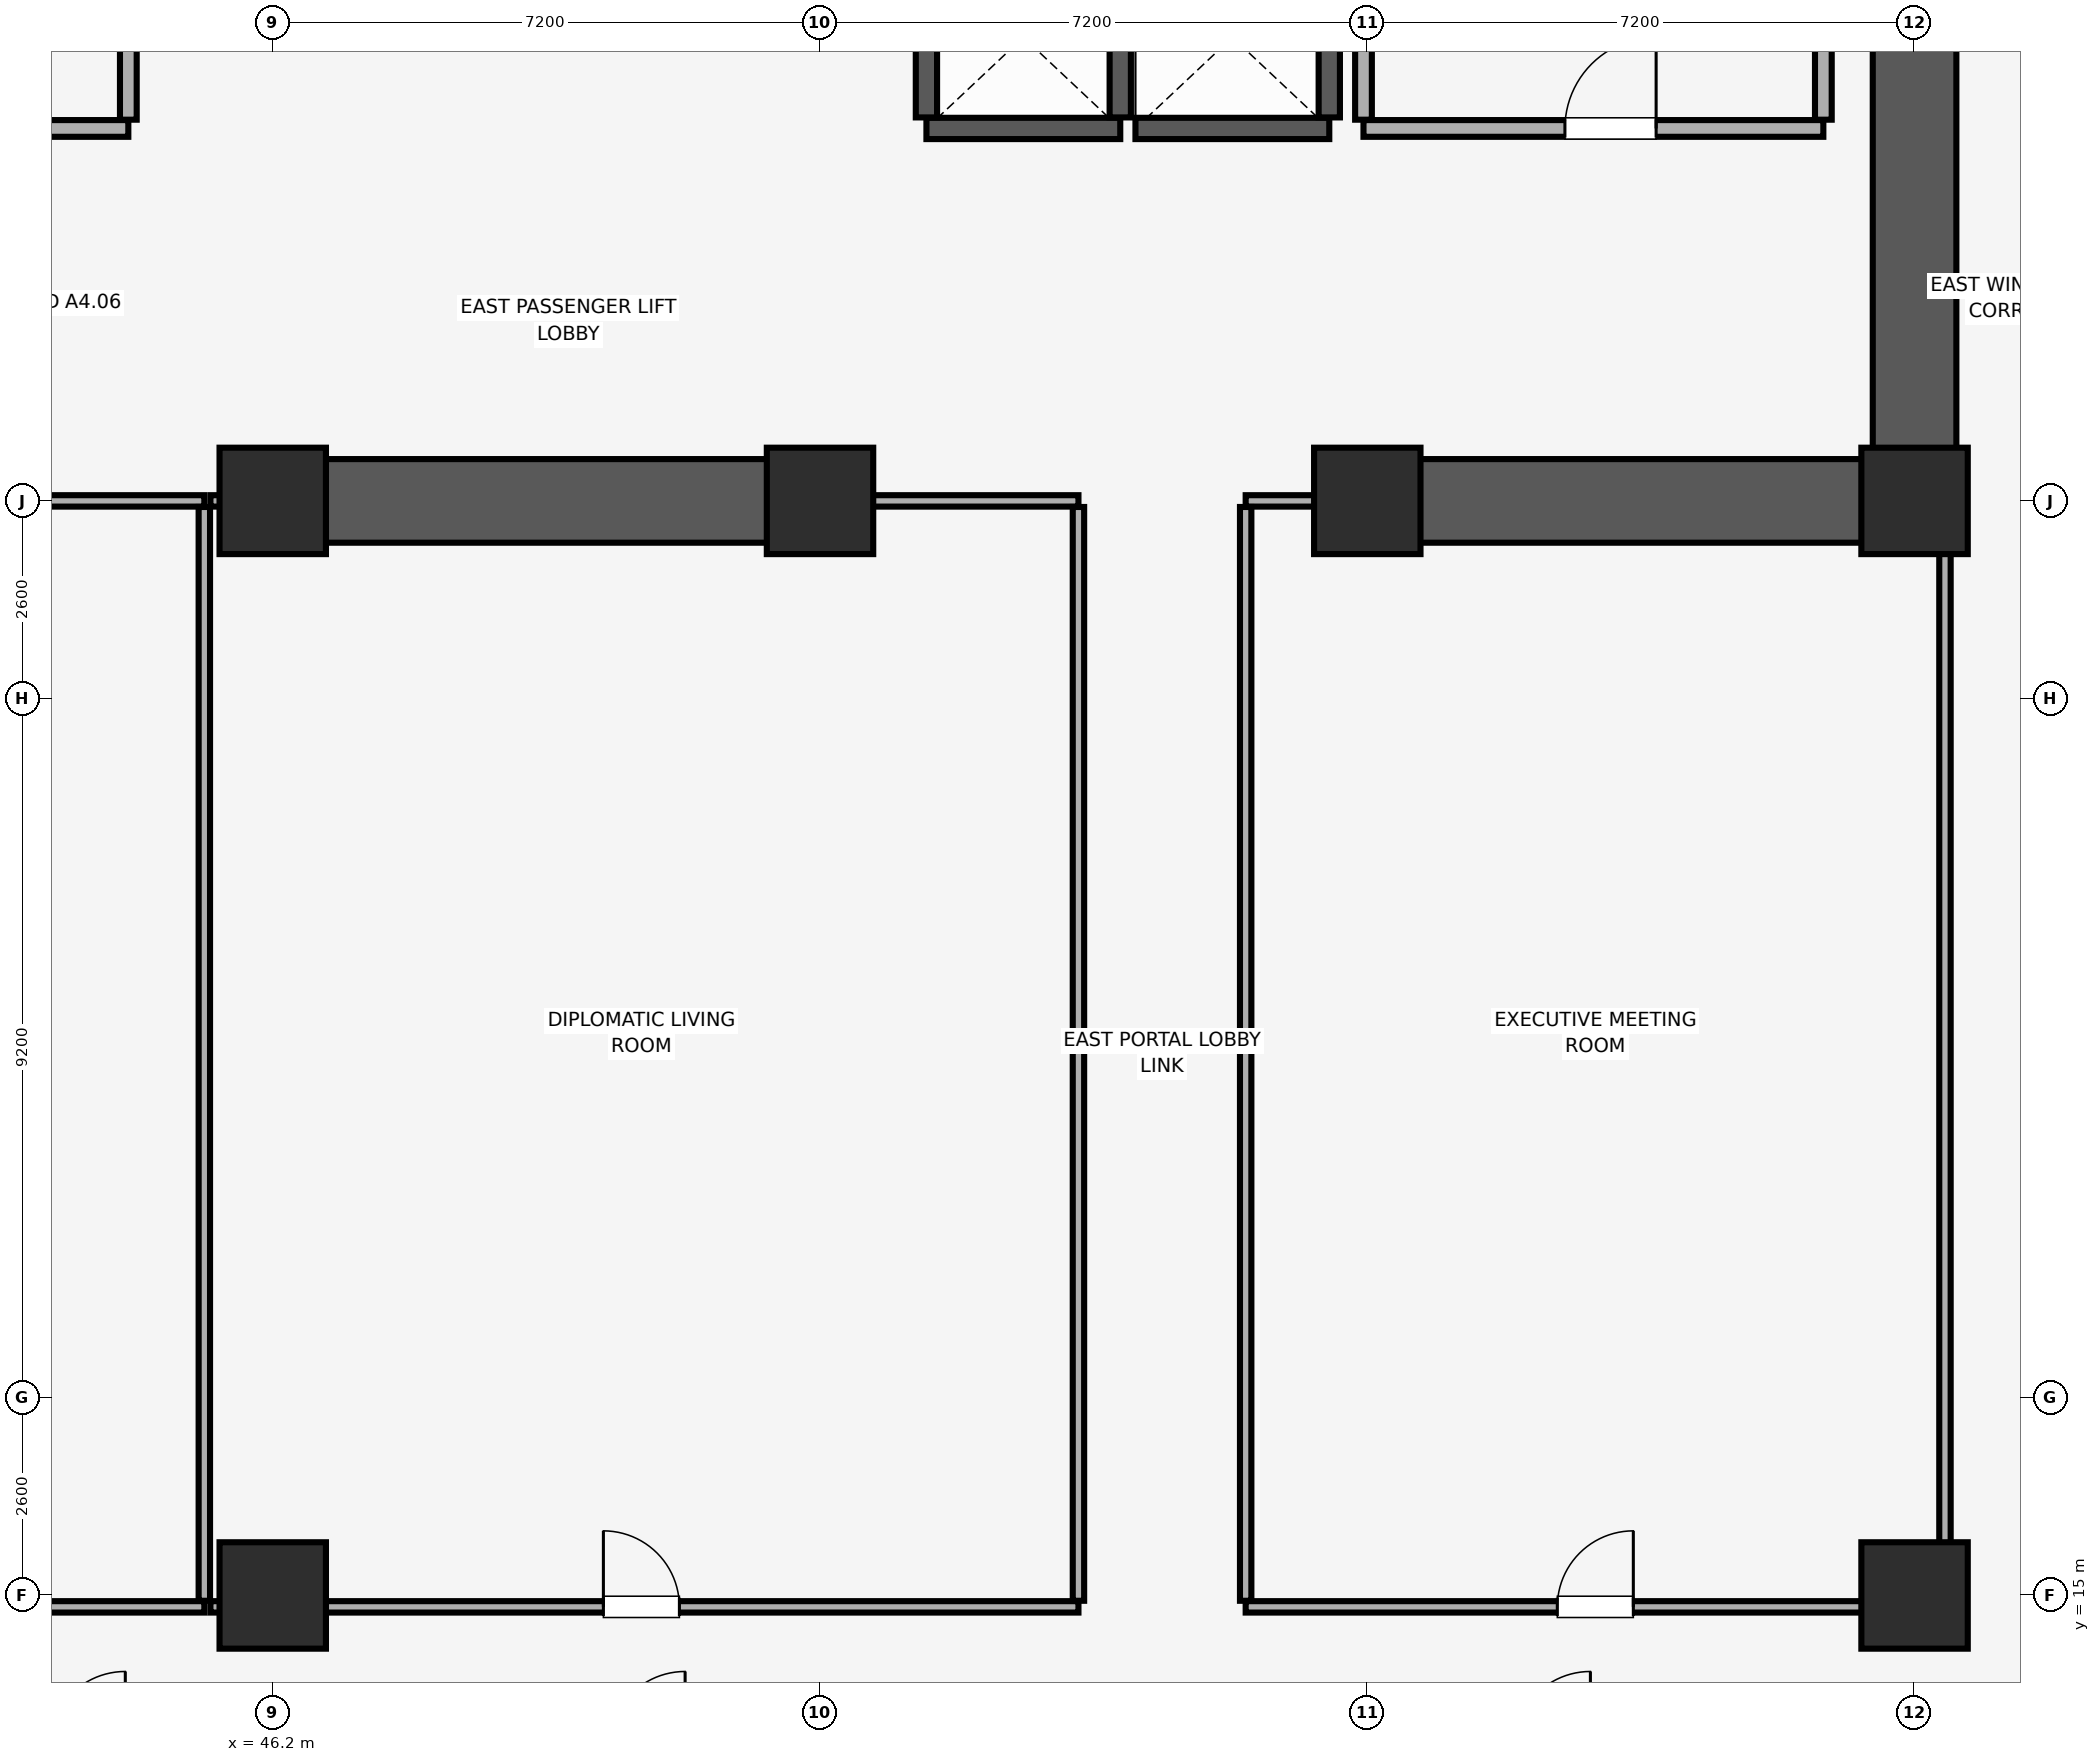
"""IFC4 building model, lengths in metres.
Left out: names, types, materials, properties, quantities, classifications, styles, units other than length and angle.
Written with IfcOpenShell. Run it as: python <this file> out.ifc"""

import sys

from ifc_helpers import new_model, si_unit, direction, frame, frame_2d, origin, origin_2d, place, context, subcontext, project, spatial, rectangle, extrude, element, fill, save


model = new_model("IFC4")
c1 = context("Model", 3, precision=1e-05, world=origin(), true_north=direction((0.0, 1.0)))
c2 = subcontext(c1, "Body", "Model", "MODEL_VIEW")
j1 = project(units=[si_unit("LENGTHUNIT", "METRE"), si_unit("PLANEANGLEUNIT", "RADIAN")], contexts=[c1])
p1 = place(None, origin())
s1 = spatial("IfcSite", under=j1, at=p1, CompositionType="ELEMENT")
p2 = place(p1, origin())
s2 = spatial("IfcBuilding", under=s1, at=p2, CompositionType="ELEMENT")
p3 = place(p2, frame((0.0, 0.0, 68.9)))
s3 = spatial("IfcBuildingStorey", under=s2, at=p3, CompositionType="ELEMENT", Elevation=68.9)
for number, where, z_axis, x_axis in (
    (1, (46.2, 15.0, 0.0), (0.0, 0.0, 1.0), (1.0, 0.0, 0.0)),
    (2, (67.8, 15.0, 0.0), (0.0, 0.0, 1.0), (1.0, 0.0, 0.0)),
    (3, (46.2, 29.4, 0.0), (0.0, 0.0, 1.0), (1.0, 0.0, 0.0)),
    (4, (53.4, 29.4, 0.0), (0.0, 0.0, 1.0), (1.0, 0.0, 0.0)),
    (5, (60.6, 29.4, 0.0), (0.0, 0.0, 1.0), (1.0, 0.0, 0.0)),
    (6, (67.8, 29.4, 0.0), (0.0, 0.0, 1.0), (1.0, 0.0, 0.0)),
):
    element("IfcColumn", number, at=place(p3, frame(where, z_axis=z_axis, x_axis=x_axis)), inside=s3, PredefinedType="COLUMN", context=c2, shape_type="SweptSolid", body=[
        extrude(rectangle(XDim=1.4, YDim=1.4, at=origin_2d()), origin(), (0.0, 0.0, 1.0), 3.51),
    ])
p4 = place(p3, frame((67.8, 29.4, 0.0), z_axis=(0.0, 0.0, 1.0), x_axis=(0.0, 1.0, 0.0)))
e7 = element("IfcWall", 7, at=p4, inside=s3, PredefinedType="SHEAR", context=c2, shape_type="SweptSolid", body=[
    extrude(rectangle(XDim=19.2, YDim=1.1, at=frame_2d((9.6, 0.0))), origin(), (0.0, 0.0, 1.0), 3.51),
])
p5 = place(p3, frame((46.0, 29.4, 0.0), z_axis=(0.0, 0.0, 1.0), x_axis=(1.0, 0.0, 0.0)))
e8 = element("IfcWall", 8, at=p5, inside=s3, PredefinedType="SHEAR", context=c2, shape_type="SweptSolid", body=[
    extrude(rectangle(XDim=7.6, YDim=1.1, at=frame_2d((3.8, 0.0))), origin(), (0.0, 0.0, 1.0), 3.51),
])
p6 = place(p3, frame((60.4, 29.4, 0.0), z_axis=(0.0, 0.0, 1.0), x_axis=(1.0, 0.0, 0.0)))
e9 = element("IfcWall", 9, at=p6, inside=s3, PredefinedType="SHEAR", context=c2, shape_type="SweptSolid", body=[
    extrude(rectangle(XDim=6.845, YDim=1.1, at=frame_2d((3.423, 0.0))), origin(), (0.0, 0.0, 1.0), 3.51),
])
p7 = place(p3, frame((54.8, 34.3, 0.0), z_axis=(0.0, 0.0, 1.0), x_axis=(1.0, 0.0, 0.0)))
e10 = element("IfcWall", 10, at=p7, inside=s3, PredefinedType="SHEAR", context=c2, shape_type="SweptSolid", body=[
    extrude(rectangle(XDim=2.55, YDim=0.28, at=frame_2d((1.275, 0.0))), origin(), (0.0, 0.0, 1.0), 3.51),
])
for number, where, z_axis, x_axis in (
    (11, (54.8, 34.445, 0.0), (0.0, 0.0, 1.0), (0.0, 1.0, 0.0)),
    (12, (57.35, 34.445, 0.0), (0.0, 0.0, 1.0), (0.0, 1.0, 0.0)),
):
    element("IfcWall", number, at=place(p3, frame(where, z_axis=z_axis, x_axis=x_axis)), inside=s3, PredefinedType="SHEAR", context=c2, shape_type="SweptSolid", body=[
        extrude(rectangle(XDim=2.11, YDim=0.28, at=frame_2d((1.055, 0.0))), origin(), (0.0, 0.0, 1.0), 3.51),
    ])
p8 = place(p3, frame((57.55, 34.3, 0.0), z_axis=(0.0, 0.0, 1.0), x_axis=(1.0, 0.0, 0.0)))
e13 = element("IfcWall", 13, at=p8, inside=s3, PredefinedType="SHEAR", context=c2, shape_type="SweptSolid", body=[
    extrude(rectangle(XDim=2.55, YDim=0.28, at=frame_2d((1.275, 0.0))), origin(), (0.0, 0.0, 1.0), 3.51),
])
p9 = place(p3, frame((60.1, 34.445, 0.0), z_axis=(0.0, 0.0, 1.0), x_axis=(0.0, 1.0, 0.0)))
e14 = element("IfcWall", 14, at=p9, inside=s3, PredefinedType="SHEAR", context=c2, shape_type="SweptSolid", body=[
    extrude(rectangle(XDim=2.11, YDim=0.28, at=frame_2d((1.055, 0.0))), origin(), (0.0, 0.0, 1.0), 3.51),
])
p10 = place(p3, frame((60.55, 34.3, 0.0), z_axis=(0.0, 0.0, 1.0), x_axis=(1.0, 0.0, 0.0)))
e15 = element("IfcWall", 15, at=p10, inside=s3, PredefinedType="PARTITIONING", context=c2, shape_type="SweptSolid", body=[
    extrude(rectangle(XDim=6.05, YDim=0.22, at=frame_2d((3.025, 0.0))), origin(), (0.0, 0.0, 1.0), 3.51),
])
p11 = place(p10, frame((2.65, 0.0, 0.0)))
e16 = element("IfcOpeningElement", 16, at=p11, cuts=e15, PredefinedType="OPENING", context=c2, shape_type="SweptSolid", body=[
    extrude(rectangle(XDim=1.2, YDim=2.15, at=frame_2d((0.6, 1.075))), frame((0.0, 0.12, 0.0), z_axis=(0.0, -1.0, 0.0), x_axis=(1.0, 0.0, 0.0)), (0.0, 0.0, 1.0), 0.24),
])
p12 = place(p3, frame((60.55, 34.415, 0.0), z_axis=(0.0, 0.0, 1.0), x_axis=(0.0, 1.0, 0.0)))
e17 = element("IfcWall", 17, at=p12, inside=s3, PredefinedType="PARTITIONING", context=c2, shape_type="SweptSolid", body=[
    extrude(rectangle(XDim=5.64, YDim=0.22, at=frame_2d((2.82, 0.0))), origin(), (0.0, 0.0, 1.0), 3.51),
])
p13 = place(p3, frame((66.6, 34.415, 0.0), z_axis=(0.0, 0.0, 1.0), x_axis=(0.0, 1.0, 0.0)))
e18 = element("IfcWall", 18, at=p13, inside=s3, PredefinedType="PARTITIONING", context=c2, shape_type="SweptSolid", body=[
    extrude(rectangle(XDim=5.43, YDim=0.22, at=frame_2d((2.715, 0.0))), origin(), (0.0, 0.0, 1.0), 3.51),
])
p14 = place(p3, frame((39.7, 34.3, 0.0), z_axis=(0.0, 0.0, 1.0), x_axis=(1.0, 0.0, 0.0)))
e19 = element("IfcWall", 19, at=p14, inside=s3, PredefinedType="PARTITIONING", context=c2, shape_type="SweptSolid", body=[
    extrude(rectangle(XDim=4.6, YDim=0.22, at=frame_2d((2.3, 0.0))), origin(), (0.0, 0.0, 1.0), 3.51),
])
p15 = place(p14, frame((1.7, 0.0, 0.0)))
e20 = element("IfcOpeningElement", 20, at=p15, cuts=e19, PredefinedType="OPENING", context=c2, shape_type="SweptSolid", body=[
    extrude(rectangle(XDim=1.2, YDim=2.15, at=frame_2d((0.6, 1.075))), frame((0.0, 0.12, 0.0), z_axis=(0.0, -1.0, 0.0), x_axis=(1.0, 0.0, 0.0)), (0.0, 0.0, 1.0), 0.24),
])
p16 = place(p3, frame((44.3, 34.415, 0.0), z_axis=(0.0, 0.0, 1.0), x_axis=(0.0, 1.0, 0.0)))
e21 = element("IfcWall", 21, at=p16, inside=s3, PredefinedType="PARTITIONING", context=c2, shape_type="SweptSolid", body=[
    extrude(rectangle(XDim=5.785, YDim=0.22, at=frame_2d((2.893, 0.0))), origin(), (0.0, 0.0, 1.0), 3.51),
])
p17 = place(p3, frame((27.2, 14.85, 0.0), z_axis=(0.0, 0.0, 1.0), x_axis=(1.0, 0.0, 0.0)))
e22 = element("IfcWall", 22, at=p17, inside=s3, PredefinedType="PARTITIONING", context=c2, shape_type="SweptSolid", body=[
    extrude(rectangle(XDim=18.1, YDim=0.15, at=frame_2d((9.05, 0.0))), origin(), (0.0, 0.0, 1.0), 2.86),
])
p18 = place(p17, frame((8.3, 0.0, 0.0)))
e23 = element("IfcOpeningElement", 23, at=p18, cuts=e22, PredefinedType="OPENING", context=c2, shape_type="SweptSolid", body=[
    extrude(rectangle(XDim=1.5, YDim=2.25, at=frame_2d((0.75, 1.125))), frame((0.0, 0.085, 0.0), z_axis=(0.0, -1.0, 0.0), x_axis=(1.0, 0.0, 0.0)), (0.0, 0.0, 1.0), 0.17),
])
p19 = place(p3, frame((38.01, 29.4, 0.0), z_axis=(0.0, 0.0, 1.0), x_axis=(1.0, 0.0, 0.0)))
e24 = element("IfcWall", 24, at=p19, inside=s3, PredefinedType="PARTITIONING", context=c2, shape_type="SweptSolid", body=[
    extrude(rectangle(XDim=7.29, YDim=0.15, at=frame_2d((3.645, 0.0))), origin(), (0.0, 0.0, 1.0), 2.41),
])
p20 = place(p3, frame((45.3, 14.93, 0.0), z_axis=(0.0, 0.0, 1.0), x_axis=(0.0, 1.0, 0.0)))
e25 = element("IfcWall", 25, at=p20, inside=s3, PredefinedType="PARTITIONING", context=c2, shape_type="SweptSolid", body=[
    extrude(rectangle(XDim=14.39, YDim=0.15, at=frame_2d((7.195, 0.0))), origin(), (0.0, 0.0, 1.0), 3.51),
])
p21 = place(p3, frame((45.38, 14.85, 0.0), z_axis=(0.0, 0.0, 1.0), x_axis=(1.0, 0.0, 0.0)))
e26 = element("IfcWall", 26, at=p21, inside=s3, PredefinedType="PARTITIONING", context=c2, shape_type="SweptSolid", body=[
    extrude(rectangle(XDim=11.42, YDim=0.15, at=frame_2d((5.71, 0.0))), origin(), (0.0, 0.0, 1.0), 2.86),
])
p22 = place(p21, frame((5.17, 0.0, 0.0)))
e27 = element("IfcOpeningElement", 27, at=p22, cuts=e26, PredefinedType="OPENING", context=c2, shape_type="SweptSolid", body=[
    extrude(rectangle(XDim=1.0, YDim=2.15, at=frame_2d((0.5, 1.075))), frame((0.0, 0.085, 0.0), z_axis=(0.0, -1.0, 0.0), x_axis=(1.0, 0.0, 0.0)), (0.0, 0.0, 1.0), 0.17),
])
p23 = place(p3, frame((45.38, 29.4, 0.0), z_axis=(0.0, 0.0, 1.0), x_axis=(1.0, 0.0, 0.0)))
e28 = element("IfcWall", 28, at=p23, inside=s3, PredefinedType="PARTITIONING", context=c2, shape_type="SweptSolid", body=[
    extrude(rectangle(XDim=0.61, YDim=0.15, at=frame_2d((0.305, 0.0))), origin(), (0.0, 0.0, 1.0), 2.41),
])
p24 = place(p3, frame((53.61, 29.4, 0.0), z_axis=(0.0, 0.0, 1.0), x_axis=(1.0, 0.0, 0.0)))
e29 = element("IfcWall", 29, at=p24, inside=s3, PredefinedType="PARTITIONING", context=c2, shape_type="SweptSolid", body=[
    extrude(rectangle(XDim=3.19, YDim=0.15, at=frame_2d((1.595, 0.0))), origin(), (0.0, 0.0, 1.0), 2.41),
])
p25 = place(p3, frame((56.8, 14.93, 0.0), z_axis=(0.0, 0.0, 1.0), x_axis=(0.0, 1.0, 0.0)))
e30 = element("IfcWall", 30, at=p25, inside=s3, PredefinedType="PARTITIONING", context=c2, shape_type="SweptSolid", body=[
    extrude(rectangle(XDim=14.39, YDim=0.15, at=frame_2d((7.195, 0.0))), origin(), (0.0, 0.0, 1.0), 2.977),
])
p26 = place(p3, frame((59.0, 14.85, 0.0), z_axis=(0.0, 0.0, 1.0), x_axis=(1.0, 0.0, 0.0)))
e31 = element("IfcWall", 31, at=p26, inside=s3, PredefinedType="PARTITIONING", context=c2, shape_type="SweptSolid", body=[
    extrude(rectangle(XDim=9.2, YDim=0.15, at=frame_2d((4.6, 0.0))), origin(), (0.0, 0.0, 1.0), 2.86),
])
p27 = place(p26, frame((4.1, 0.0, 0.0)))
e32 = element("IfcOpeningElement", 32, at=p27, cuts=e31, PredefinedType="OPENING", context=c2, shape_type="SweptSolid", body=[
    extrude(rectangle(XDim=1.0, YDim=2.15, at=frame_2d((0.5, 1.075))), frame((0.0, 0.085, 0.0), z_axis=(0.0, -1.0, 0.0), x_axis=(1.0, 0.0, 0.0)), (0.0, 0.0, 1.0), 0.17),
])
p28 = place(p3, frame((59.0, 29.4, 0.0), z_axis=(0.0, 0.0, 1.0), x_axis=(1.0, 0.0, 0.0)))
e33 = element("IfcWall", 33, at=p28, inside=s3, PredefinedType="PARTITIONING", context=c2, shape_type="SweptSolid", body=[
    extrude(rectangle(XDim=1.39, YDim=0.15, at=frame_2d((0.695, 0.0))), origin(), (0.0, 0.0, 1.0), 2.41),
])
p29 = place(p3, frame((59.0, 14.93, 0.0), z_axis=(0.0, 0.0, 1.0), x_axis=(0.0, 1.0, 0.0)))
e34 = element("IfcWall", 34, at=p29, inside=s3, PredefinedType="PARTITIONING", context=c2, shape_type="SweptSolid", body=[
    extrude(rectangle(XDim=14.39, YDim=0.15, at=frame_2d((7.195, 0.0))), origin(), (0.0, 0.0, 1.0), 3.51),
])
p30 = place(p3, frame((68.2, 14.93, 0.0), z_axis=(0.0, 0.0, 1.0), x_axis=(0.0, 1.0, 0.0)))
e35 = element("IfcWall", 35, at=p30, inside=s3, PredefinedType="PARTITIONING", context=c2, shape_type="SweptSolid", body=[
    extrude(rectangle(XDim=14.46, YDim=0.15, at=frame_2d((7.23, 0.0))), origin(), (0.0, 0.0, 1.0), 3.51),
])
p31 = place(p11, origin())
e36 = element("IfcDoor", 36, at=p31, inside=s3, OperationType="SINGLE_SWING_RIGHT", PredefinedType="DOOR", context=c2, shape_type="SweptSolid", body=[
    extrude(rectangle(XDim=1.2, YDim=2.15, at=frame_2d((0.6, 1.075))), frame((0.0, 0.025, 0.0), z_axis=(0.0, -1.0, 0.0), x_axis=(1.0, 0.0, 0.0)), (0.0, 0.0, 1.0), 0.05),
])
fill(e16, e36)
p32 = place(p22, origin())
e37 = element("IfcDoor", 37, at=p32, inside=s3, OperationType="SINGLE_SWING_LEFT", PredefinedType="DOOR", context=c2, shape_type="SweptSolid", body=[
    extrude(rectangle(XDim=1.0, YDim=2.15, at=frame_2d((0.5, 1.075))), frame((0.0, 0.025, 0.0), z_axis=(0.0, -1.0, 0.0), x_axis=(1.0, 0.0, 0.0)), (0.0, 0.0, 1.0), 0.05),
])
fill(e27, e37)
p33 = place(p27, origin())
e38 = element("IfcDoor", 38, at=p33, inside=s3, OperationType="SINGLE_SWING_RIGHT", PredefinedType="DOOR", context=c2, shape_type="SweptSolid", body=[
    extrude(rectangle(XDim=1.0, YDim=2.15, at=frame_2d((0.5, 1.075))), frame((0.0, 0.025, 0.0), z_axis=(0.0, -1.0, 0.0), x_axis=(1.0, 0.0, 0.0)), (0.0, 0.0, 1.0), 0.05),
])
fill(e32, e38)
save(model, sys.argv[1])
